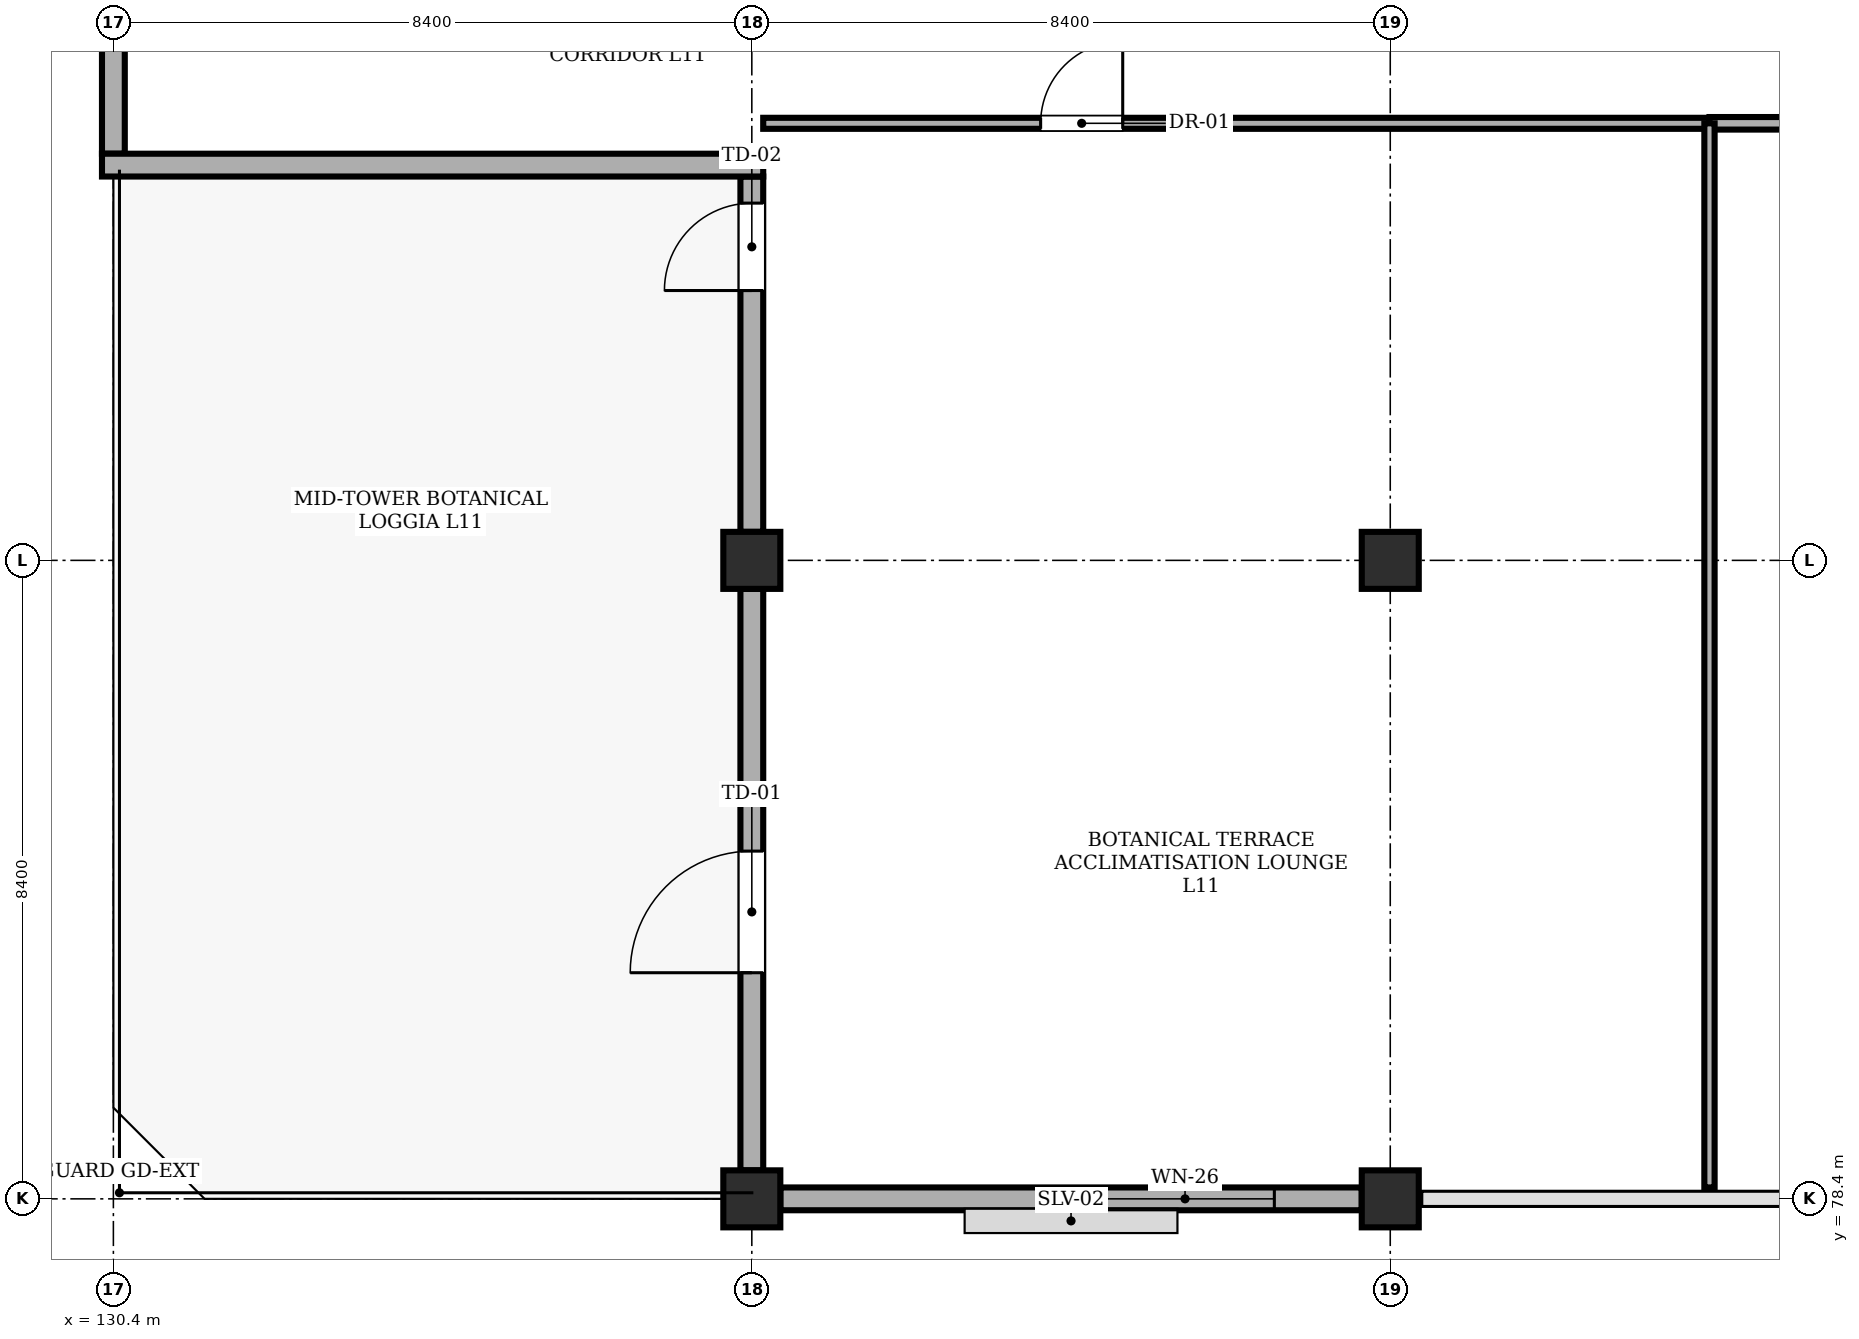
"""IFC4 building model, lengths in metres.
Left out: names, types, materials, properties, quantities, classifications, styles, units other than length and angle.
Written with IfcOpenShell. Run it as: python <this file> out.ifc"""

import sys

from ifc_helpers import new_model, si_unit, direction, frame, frame_2d, origin, origin_2d, place, context, subcontext, project, spatial, rectangle, extrude, element, fill, save


model = new_model("IFC4")
c1 = context("Model", 3, precision=1e-05, world=origin(), true_north=direction((0.0, 1.0)))
c2 = subcontext(c1, "Body", "Model", "MODEL_VIEW")
j1 = project(units=[si_unit("LENGTHUNIT", "METRE"), si_unit("PLANEANGLEUNIT", "RADIAN")], contexts=[c1])
p1 = place(None, origin())
s1 = spatial("IfcSite", under=j1, at=p1, CompositionType="ELEMENT")
p2 = place(p1, origin())
s2 = spatial("IfcBuilding", under=s1, at=p2, CompositionType="ELEMENT")
p3 = place(p2, frame((0.0, 0.0, 44.4)))
s3 = spatial("IfcBuildingStorey", under=s2, at=p3, CompositionType="ELEMENT", Elevation=44.4)
for number, where, z_axis, x_axis in (
    (1, (138.8, 78.4, 0.0), (0.0, 0.0, 1.0), (1.0, 0.0, 0.0)),
    (2, (138.8, 86.8, 0.0), (0.0, 0.0, 1.0), (1.0, 0.0, 0.0)),
    (3, (147.2, 78.4, 0.0), (0.0, 0.0, 1.0), (1.0, 0.0, 0.0)),
    (4, (147.2, 86.8, 0.0), (0.0, 0.0, 1.0), (1.0, 0.0, 0.0)),
):
    element("IfcColumn", number, at=place(p3, frame(where, z_axis=z_axis, x_axis=x_axis)), inside=s3, PredefinedType="COLUMN", context=c2, shape_type="SweptSolid", body=[
        extrude(rectangle(XDim=0.75, YDim=0.75, at=origin_2d()), origin(), (0.0, 0.0, 1.0), 4.01),
    ])
p4 = place(p3, frame((146.825, 78.4, 0.0), z_axis=(0.0, 0.0, 1.0), x_axis=(-1.0, 0.0, 0.0)))
e5 = element("IfcWall", 5, at=p4, inside=s3, PredefinedType="STANDARD", context=c2, shape_type="SweptSolid", body=[
    extrude(rectangle(XDim=7.65, YDim=0.3, at=frame_2d((3.825, 0.0))), origin(), (0.0, 0.0, 1.0), 3.31),
])
p5 = place(p4, frame((1.15, 0.0, 0.95)))
e6 = element("IfcOpeningElement", 6, at=p5, cuts=e5, PredefinedType="OPENING", context=c2, shape_type="SweptSolid", body=[
    extrude(rectangle(XDim=2.35, YDim=1.95, at=frame_2d((1.175, 0.975))), frame((0.0, 0.16, 0.0), z_axis=(0.0, -1.0, 0.0), x_axis=(1.0, 0.0, 0.0)), (0.0, 0.0, 1.0), 0.32),
])
p6 = place(p3, frame((130.4, 92.15, 0.0), z_axis=(0.0, 0.0, 1.0), x_axis=(0.0, 1.0, 0.0)))
e7 = element("IfcWall", 7, at=p6, inside=s3, PredefinedType="STANDARD", context=c2, shape_type="SweptSolid", body=[
    extrude(rectangle(XDim=2.675, YDim=0.3, at=frame_2d((1.337, 0.0))), origin(), (0.0, 0.0, 1.0), 4.01),
])
p7 = place(p3, frame((138.8, 78.775, 0.0), z_axis=(0.0, 0.0, 1.0), x_axis=(0.0, 1.0, 0.0)))
e8 = element("IfcWall", 8, at=p7, inside=s3, PredefinedType="STANDARD", context=c2, shape_type="SweptSolid", body=[
    extrude(rectangle(XDim=7.65, YDim=0.3, at=frame_2d((3.825, 0.0))), origin(), (0.0, 0.0, 1.0), 3.31),
])
p8 = place(p7, frame((2.6, 0.0, 0.0)))
e9 = element("IfcOpeningElement", 9, at=p8, cuts=e8, PredefinedType="OPENING", context=c2, shape_type="SweptSolid", body=[
    extrude(rectangle(XDim=1.6, YDim=2.25, at=frame_2d((0.8, 1.125))), frame((0.0, 0.16, 0.0), z_axis=(0.0, -1.0, 0.0), x_axis=(1.0, 0.0, 0.0)), (0.0, 0.0, 1.0), 0.32),
])
p9 = place(p3, frame((138.8, 87.175, 0.0), z_axis=(0.0, 0.0, 1.0), x_axis=(0.0, 1.0, 0.0)))
e10 = element("IfcWall", 10, at=p9, inside=s3, PredefinedType="STANDARD", context=c2, shape_type="SweptSolid", body=[
    extrude(rectangle(XDim=4.675, YDim=0.3, at=frame_2d((2.337, 0.0))), origin(), (0.0, 0.0, 1.0), 3.31),
])
p10 = place(p9, frame((3.175, 0.0, 0.0)))
e11 = element("IfcOpeningElement", 11, at=p10, cuts=e10, PredefinedType="OPENING", context=c2, shape_type="SweptSolid", body=[
    extrude(rectangle(XDim=1.15, YDim=2.25, at=frame_2d((0.575, 1.125))), frame((0.0, 0.16, 0.0), z_axis=(0.0, -1.0, 0.0), x_axis=(1.0, 0.0, 0.0)), (0.0, 0.0, 1.0), 0.32),
])
p11 = place(p3, frame((138.95, 92.0, 0.0), z_axis=(0.0, 0.0, 1.0), x_axis=(-1.0, 0.0, 0.0)))
e12 = element("IfcWall", 12, at=p11, inside=s3, PredefinedType="STANDARD", context=c2, shape_type="SweptSolid", body=[
    extrude(rectangle(XDim=8.7, YDim=0.3, at=frame_2d((4.35, 0.0))), origin(), (0.0, 0.0, 1.0), 4.01),
])
p12 = place(p3, frame((138.95, 92.55, 0.0), z_axis=(0.0, 0.0, 1.0), x_axis=(1.0, 0.0, 0.0)))
e13 = element("IfcWall", 13, at=p12, inside=s3, PredefinedType="PARTITIONING", context=c2, shape_type="SweptSolid", body=[
    extrude(rectangle(XDim=12.45, YDim=0.145, at=frame_2d((6.225, 0.0))), origin(), (0.0, 0.0, 1.0), 4.01),
])
p13 = place(p12, frame((3.65, 0.0, 0.0)))
e14 = element("IfcOpeningElement", 14, at=p13, cuts=e13, PredefinedType="OPENING", context=c2, shape_type="SweptSolid", body=[
    extrude(rectangle(XDim=1.08, YDim=2.15, at=frame_2d((0.54, 1.075))), frame((0.0, 0.083, 0.0), z_axis=(0.0, -1.0, 0.0), x_axis=(1.0, 0.0, 0.0)), (0.0, 0.0, 1.0), 0.165),
])
p14 = place(p3, frame((151.4, 92.55, 0.0), z_axis=(0.0, 0.0, 1.0), x_axis=(1.0, 0.0, 0.0)))
e15 = element("IfcWall", 15, at=p14, inside=s3, PredefinedType="PARTITIONING", context=c2, shape_type="SweptSolid", body=[
    extrude(rectangle(XDim=11.95, YDim=0.165, at=frame_2d((5.975, 0.0))), origin(), (0.0, 0.0, 1.0), 4.01),
])
p15 = place(p14, frame((6.8, 0.0, 0.0)))
e16 = element("IfcOpeningElement", 16, at=p15, cuts=e15, PredefinedType="OPENING", context=c2, shape_type="SweptSolid", body=[
    extrude(rectangle(XDim=1.14, YDim=2.18, at=frame_2d((0.57, 1.09))), frame((0.0, 0.093, 0.0), z_axis=(0.0, -1.0, 0.0), x_axis=(1.0, 0.0, 0.0)), (0.0, 0.0, 1.0), 0.185),
])
p16 = place(p3, frame((151.4, 78.55, 0.0), z_axis=(0.0, 0.0, 1.0), x_axis=(0.0, 1.0, 0.0)))
e17 = element("IfcWall", 17, at=p16, inside=s3, PredefinedType="PARTITIONING", context=c2, shape_type="SweptSolid", body=[
    extrude(rectangle(XDim=14.0, YDim=0.135, at=frame_2d((7.0, 0.0))), origin(), (0.0, 0.0, 1.0), 3.56),
])
p17 = place(p5, origin())
e18 = element("IfcWindow", 18, at=p17, inside=s3, PartitioningType="TRIPLE_PANEL_VERTICAL", PredefinedType="WINDOW", context=c2, shape_type="SweptSolid", body=[
    extrude(rectangle(XDim=2.35, YDim=1.95, at=frame_2d((1.175, 0.975))), frame((0.0, 0.03, 0.0), z_axis=(0.0, -1.0, 0.0), x_axis=(1.0, 0.0, 0.0)), (0.0, 0.0, 1.0), 0.06),
])
fill(e6, e18)
p18 = place(p8, origin())
e19 = element("IfcDoor", 19, at=p18, inside=s3, OperationType="SINGLE_SWING_LEFT", PredefinedType="DOOR", context=c2, shape_type="SweptSolid", body=[
    extrude(rectangle(XDim=1.6, YDim=2.25, at=frame_2d((0.8, 1.125))), frame((0.0, 0.025, 0.0), z_axis=(0.0, -1.0, 0.0), x_axis=(1.0, 0.0, 0.0)), (0.0, 0.0, 1.0), 0.05),
])
fill(e9, e19)
p19 = place(p10, origin())
e20 = element("IfcDoor", 20, at=p19, inside=s3, OperationType="SINGLE_SWING_LEFT", PredefinedType="DOOR", context=c2, shape_type="SweptSolid", body=[
    extrude(rectangle(XDim=1.15, YDim=2.25, at=frame_2d((0.575, 1.125))), frame((0.0, 0.025, 0.0), z_axis=(0.0, -1.0, 0.0), x_axis=(1.0, 0.0, 0.0)), (0.0, 0.0, 1.0), 0.05),
])
fill(e11, e20)
p20 = place(p13, origin())
e21 = element("IfcDoor", 21, at=p20, inside=s3, OperationType="SINGLE_SWING_RIGHT", PredefinedType="DOOR", context=c2, shape_type="SweptSolid", body=[
    extrude(rectangle(XDim=1.08, YDim=2.15, at=frame_2d((0.54, 1.075))), frame((0.0, 0.025, 0.0), z_axis=(0.0, -1.0, 0.0), x_axis=(1.0, 0.0, 0.0)), (0.0, 0.0, 1.0), 0.05),
])
fill(e14, e21)
save(model, sys.argv[1])
